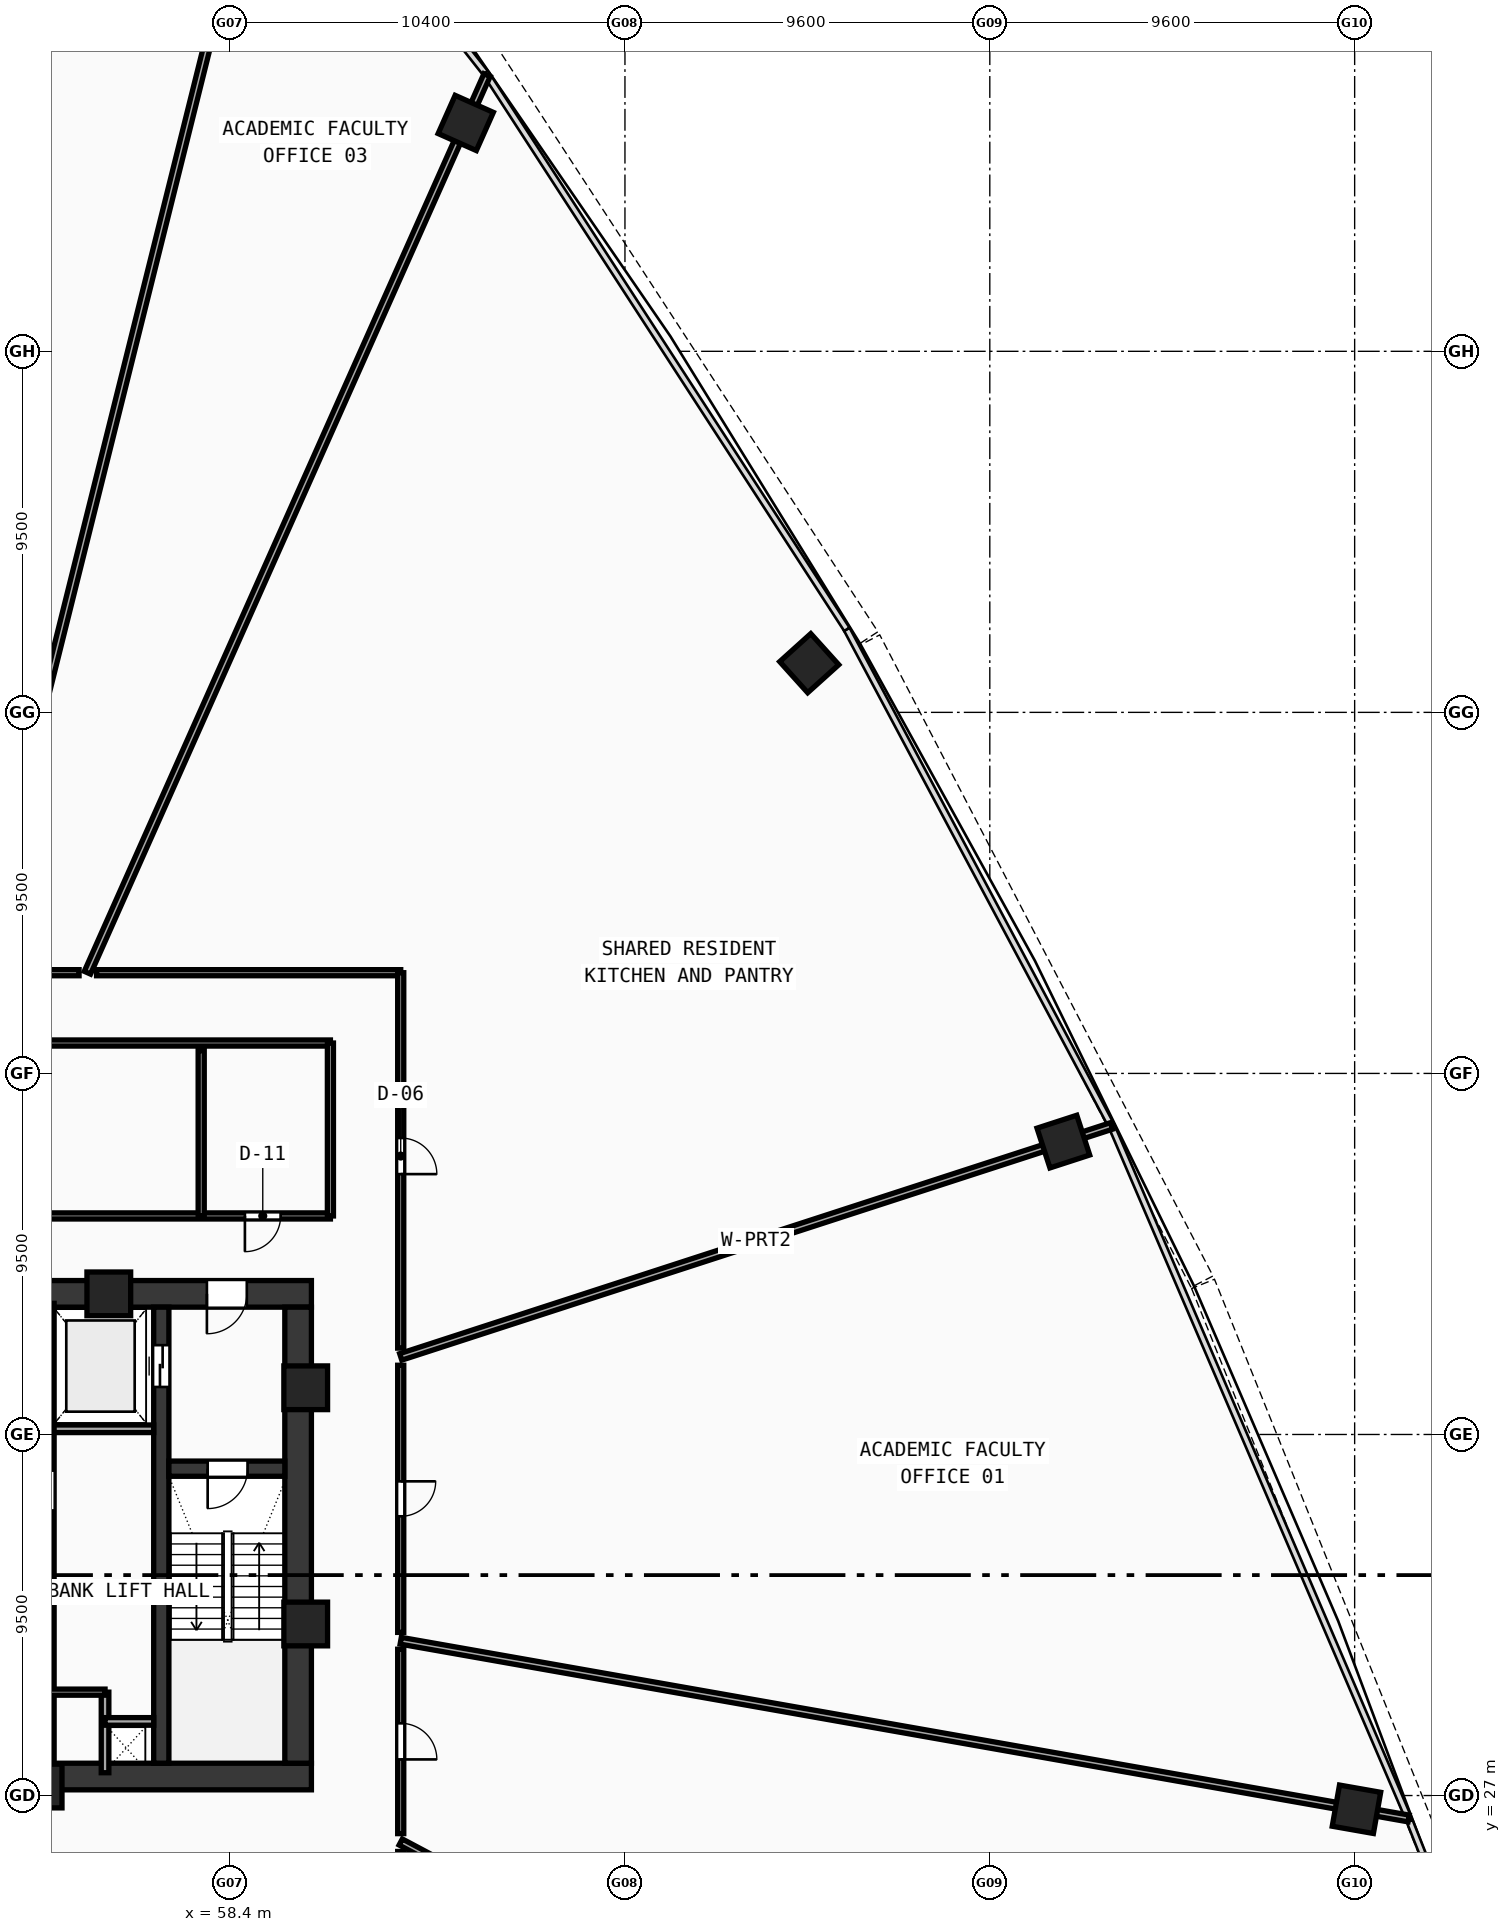
"""IFC4 building model, lengths in metres.
Left out: names, types, materials, properties, quantities, classifications, styles, units other than length and angle.
Written with IfcOpenShell. Run it as: python <this file> out.ifc"""

import sys

from ifc_helpers import new_model, si_unit, direction, frame, frame_2d, origin, origin_with_axes, origin_2d, place, context, subcontext, project, spatial, rectangle, hollow_rectangle, extrude, source, transform, mapped, element, fill, save


model = new_model("IFC4")
c1 = context("Model", 3, precision=1e-05, world=origin(), true_north=direction((0.0, 1.0)))
c2 = subcontext(c1, "Body", "Model", "MODEL_VIEW")
j1 = project(units=[si_unit("LENGTHUNIT", "METRE"), si_unit("PLANEANGLEUNIT", "RADIAN")], contexts=[c1])
p1 = place(None, origin())
s1 = spatial("IfcSite", under=j1, at=p1, CompositionType="ELEMENT")
p2 = place(p1, origin())
s2 = spatial("IfcBuilding", under=s1, at=p2, CompositionType="ELEMENT")
p3 = place(p2, frame((0.0, 0.0, 52.18)))
s3 = spatial("IfcBuildingStorey", under=s2, at=p3, CompositionType="ELEMENT", Elevation=52.18)
p4 = place(p3, frame((35.45, 27.5, 0.0), z_axis=(0.0, 0.0, 1.0), x_axis=(1.0, 0.0, 0.0)))
e1 = element("IfcWall", 1, at=p4, inside=s3, PredefinedType="SHEAR", context=c2, shape_type="SweptSolid", body=[
    extrude(rectangle(XDim=25.1, YDim=0.7, at=frame_2d((12.55, 0.0))), origin(), (0.0, 0.0, 1.0), 3.37),
])
p5 = place(p3, frame((49.2, 40.2, 0.0), z_axis=(0.0, 0.0, 1.0), x_axis=(1.0, 0.0, 0.0)))
e2 = element("IfcWall", 2, at=p5, inside=s3, PredefinedType="SHEAR", context=c2, shape_type="SweptSolid", body=[
    extrude(rectangle(XDim=11.35, YDim=0.7, at=frame_2d((5.675, 0.0))), origin(), (0.0, 0.0, 1.0), 3.37),
])
p6 = place(p5, frame((8.6, 0.0, 0.0)))
e3 = element("IfcOpeningElement", 3, at=p6, cuts=e2, PredefinedType="OPENING", context=c2, shape_type="SweptSolid", body=[
    extrude(rectangle(XDim=1.05, YDim=2.1, at=frame_2d((0.525, 1.05))), frame((0.0, 0.36, 0.0), z_axis=(0.0, -1.0, 0.0), x_axis=(1.0, 0.0, 0.0)), (0.0, 0.0, 1.0), 0.72),
])
p7 = place(p3, frame((60.2, 27.85, 0.0), z_axis=(0.0, 0.0, 1.0), x_axis=(0.0, 1.0, 0.0)))
e4 = element("IfcWall", 4, at=p7, inside=s3, PredefinedType="SHEAR", context=c2, shape_type="SweptSolid", body=[
    extrude(rectangle(XDim=12.0, YDim=0.7, at=frame_2d((6.0, 0.0))), origin(), (0.0, 0.0, 1.0), 3.37),
])
p8 = place(p3, frame((56.6, 27.85, 0.0), z_axis=(0.0, 0.0, 1.0), x_axis=(0.0, 1.0, 0.0)))
e5 = element("IfcWall", 5, at=p8, inside=s3, PredefinedType="SHEAR", context=c2, shape_type="SweptSolid", body=[
    extrude(rectangle(XDim=12.0, YDim=0.4, at=frame_2d((6.0, 0.0))), origin(), (0.0, 0.0, 1.0), 3.37),
])
p9 = place(p8, frame((9.9, 0.0, 0.0)))
e6 = element("IfcOpeningElement", 6, at=p9, cuts=e5, PredefinedType="OPENING", context=c2, shape_type="SweptSolid", body=[
    extrude(rectangle(XDim=1.1, YDim=2.1, at=frame_2d((0.55, 1.05))), frame((0.0, 0.21, 0.0), z_axis=(0.0, -1.0, 0.0), x_axis=(1.0, 0.0, 0.0)), (0.0, 0.0, 1.0), 0.42),
])
p10 = place(p3, frame((56.8, 35.6, 0.0), z_axis=(0.0, 0.0, 1.0), x_axis=(1.0, 0.0, 0.0)))
e7 = element("IfcWall", 7, at=p10, inside=s3, PredefinedType="SHEAR", context=c2, shape_type="SweptSolid", body=[
    extrude(rectangle(XDim=3.05, YDim=0.4, at=frame_2d((1.525, 0.0))), origin(), (0.0, 0.0, 1.0), 3.37),
])
p11 = place(p10, frame((1.02, 0.0, 0.0)))
e8 = element("IfcOpeningElement", 8, at=p11, cuts=e7, PredefinedType="OPENING", context=c2, shape_type="SweptSolid", body=[
    extrude(rectangle(XDim=1.05, YDim=2.1, at=frame_2d((0.525, 1.05))), frame((0.0, 0.21, 0.0), z_axis=(0.0, -1.0, 0.0), x_axis=(1.0, 0.0, 0.0)), (0.0, 0.0, 1.0), 0.42),
])
m1 = source(origin(), c2, "Body", "SweptSolid", [
    extrude(hollow_rectangle(XDim=1.15, YDim=1.15, WallThickness=0.048, at=origin_2d()), origin(), (0.0, 0.0, 1.0), 3.63),
])
for number, where, z_axis, x_axis in (
    (9, (53.412, 27.25, -0.26), (0.0, 0.0, 1.0), (1.0, 0.0, 0.0)),
    (10, (60.4, 31.513, -0.26), (0.0, 0.0, 1.0), (1.0, 0.0, 0.0)),
    (11, (60.4, 37.729, -0.26), (0.0, 0.0, 1.0), (1.0, 0.0, 0.0)),
    (12, (55.219, 40.2, -0.26), (0.0, 0.0, 1.0), (1.0, 0.0, 0.0)),
):
    element("IfcColumn", number, at=place(p3, frame(where, z_axis=z_axis, x_axis=x_axis)), inside=s3, PredefinedType="COLUMN", context=c2, shape_type="MappedRepresentation", body=[
        mapped(m1, transform((0.0, 0.0, 0.0), scale=1.0)),
    ])
m2 = source(origin(), c2, "Body", "SweptSolid", [
    extrude(hollow_rectangle(XDim=1.1, YDim=1.1, WallThickness=0.045, at=origin_2d()), origin(), (0.0, 0.0, 1.0), 3.63),
])
for number, where, z_axis, x_axis in (
    (13, (88.048, 26.638, -0.26), (0.0, 0.0, 1.0), (0.174, 0.985, 0.0)),
    (14, (80.335, 44.206, -0.26), (0.0, 0.0, 1.0), (-0.309, 0.951, 0.0)),
    (15, (73.649, 56.794, -0.26), (0.0, 0.0, 1.0), (-0.669, 0.743, 0.0)),
    (16, (64.611, 71.009, -0.26), (0.0, 0.0, 1.0), (-0.914, 0.407, 0.0)),
):
    element("IfcColumn", number, at=place(p3, frame(where, z_axis=z_axis, x_axis=x_axis)), inside=s3, PredefinedType="COLUMN", context=c2, shape_type="MappedRepresentation", body=[
        mapped(m2, transform((0.0, 0.0, 0.0), scale=1.0)),
    ])
p12 = place(p3, frame((53.68, 36.65, 0.0), z_axis=(0.0, 0.0, 1.0), x_axis=(0.0, 1.0, 0.0)))
e17 = element("IfcWall", 17, at=p12, inside=s3, PredefinedType="SOLIDWALL", context=c2, shape_type="SweptSolid", body=[
    extrude(rectangle(XDim=3.3, YDim=0.2, at=frame_2d((1.65, 0.0))), origin(), (0.0, 0.0, 1.0), 3.37),
])
p13 = place(p3, frame((53.68, 36.65, 0.0), z_axis=(0.0, 0.0, 1.0), x_axis=(1.0, 0.0, 0.0)))
e18 = element("IfcWall", 18, at=p13, inside=s3, PredefinedType="SOLIDWALL", context=c2, shape_type="SweptSolid", body=[
    extrude(rectangle(XDim=2.72, YDim=0.2, at=frame_2d((1.36, 0.0))), origin(), (0.0, 0.0, 1.0), 3.37),
])
p14 = place(p3, frame((53.68, 27.6, 0.0), z_axis=(0.0, 0.0, 1.0), x_axis=(0.0, 1.0, 0.0)))
e19 = element("IfcWall", 19, at=p14, inside=s3, PredefinedType="SOLIDWALL", context=c2, shape_type="SweptSolid", body=[
    extrude(rectangle(XDim=9.05, YDim=0.2, at=frame_2d((4.525, 0.0))), origin(), (0.0, 0.0, 1.0), 3.37),
])
p15 = place(p14, frame((6.9, 0.0, 0.0)))
e20 = element("IfcOpeningElement", 20, at=p15, cuts=e19, PredefinedType="OPENING", context=c2, shape_type="SweptSolid", body=[
    extrude(rectangle(XDim=1.05, YDim=2.1, at=frame_2d((0.525, 1.05))), frame((0.0, 0.11, 0.0), z_axis=(0.0, -1.0, 0.0), x_axis=(1.0, 0.0, 0.0)), (0.0, 0.0, 1.0), 0.22),
])
p16 = place(p3, frame((55.12, 27.6, 0.0), z_axis=(0.0, 0.0, 1.0), x_axis=(0.0, 1.0, 0.0)))
e21 = element("IfcWall", 21, at=p16, inside=s3, PredefinedType="SOLIDWALL", context=c2, shape_type="SweptSolid", body=[
    extrude(rectangle(XDim=2.12, YDim=0.2, at=frame_2d((1.06, 0.0))), origin(), (0.0, 0.0, 1.0), 3.37),
])
p17 = place(p3, frame((55.12, 28.95, 0.0), z_axis=(0.0, 0.0, 1.0), x_axis=(1.0, 0.0, 0.0)))
e22 = element("IfcWall", 22, at=p17, inside=s3, PredefinedType="SOLIDWALL", context=c2, shape_type="SweptSolid", body=[
    extrude(rectangle(XDim=1.28, YDim=0.2, at=frame_2d((0.64, 0.0))), origin(), (0.0, 0.0, 1.0), 3.37),
])
p18 = place(p3, frame((51.05, 29.72, 0.0), z_axis=(0.0, 0.0, 1.0), x_axis=(1.0, 0.0, 0.0)))
e23 = element("IfcWall", 23, at=p18, inside=s3, PredefinedType="PARTITIONING", context=c2, shape_type="SweptSolid", body=[
    extrude(rectangle(XDim=4.07, YDim=0.16, at=frame_2d((2.035, 0.0))), origin(), (0.0, 0.0, 1.0), 3.37),
])
p19 = place(p18, frame((0.5, 0.0, 0.0)))
e24 = element("IfcOpeningElement", 24, at=p19, cuts=e23, PredefinedType="OPENING", context=c2, shape_type="SweptSolid", body=[
    extrude(rectangle(XDim=0.9, YDim=2.1, at=frame_2d((0.45, 1.05))), frame((0.0, 0.09, 0.0), z_axis=(0.0, -1.0, 0.0), x_axis=(1.0, 0.0, 0.0)), (0.0, 0.0, 1.0), 0.18),
])
p20 = place(p3, frame((45.92, 42.25, 0.0), z_axis=(0.0, 0.0, 1.0), x_axis=(1.0, 0.0, 0.0)))
e25 = element("IfcWall", 25, at=p20, inside=s3, PredefinedType="PARTITIONING", context=c2, shape_type="SweptSolid", body=[
    extrude(rectangle(XDim=15.13, YDim=0.16, at=frame_2d((7.565, 0.0))), origin(), (0.0, 0.0, 1.0), 2.67),
])
p21 = place(p20, frame((2.1, 0.0, 0.0)))
e26 = element("IfcOpeningElement", 26, at=p21, cuts=e25, PredefinedType="OPENING", context=c2, shape_type="SweptSolid", body=[
    extrude(rectangle(XDim=0.92, YDim=2.1, at=frame_2d((0.46, 1.05))), frame((0.0, 0.09, 0.0), z_axis=(0.0, -1.0, 0.0), x_axis=(1.0, 0.0, 0.0)), (0.0, 0.0, 1.0), 0.18),
])
p22 = place(p20, frame((12.88, 0.0, 0.0)))
e27 = element("IfcOpeningElement", 27, at=p22, cuts=e25, PredefinedType="OPENING", context=c2, shape_type="SweptSolid", body=[
    extrude(rectangle(XDim=0.94, YDim=2.1, at=frame_2d((0.47, 1.05))), frame((0.0, 0.09, 0.0), z_axis=(0.0, -1.0, 0.0), x_axis=(1.0, 0.0, 0.0)), (0.0, 0.0, 1.0), 0.18),
])
p23 = place(p3, frame((45.92, 46.8, 0.0), z_axis=(0.0, 0.0, 1.0), x_axis=(1.0, 0.0, 0.0)))
e28 = element("IfcWall", 28, at=p23, inside=s3, PredefinedType="PARTITIONING", context=c2, shape_type="SweptSolid", body=[
    extrude(rectangle(XDim=15.13, YDim=0.16, at=frame_2d((7.565, 0.0))), origin(), (0.0, 0.0, 1.0), 2.67),
])
p24 = place(p3, frame((61.05, 42.25, 0.0), z_axis=(0.0, 0.0, 1.0), x_axis=(0.0, 1.0, 0.0)))
e29 = element("IfcWall", 29, at=p24, inside=s3, PredefinedType="PARTITIONING", context=c2, shape_type="SweptSolid", body=[
    extrude(rectangle(XDim=4.55, YDim=0.16, at=frame_2d((2.275, 0.0))), origin(), (0.0, 0.0, 1.0), 2.67),
])
p25 = place(p3, frame((57.65, 42.25, 0.0), z_axis=(0.0, 0.0, 1.0), x_axis=(0.0, 1.0, 0.0)))
e30 = element("IfcWall", 30, at=p25, inside=s3, PredefinedType="PARTITIONING", context=c2, shape_type="SweptSolid", body=[
    extrude(rectangle(XDim=4.35, YDim=0.16, at=frame_2d((2.175, 0.0))), origin(), (0.0, 0.0, 1.0), 2.67),
])
p26 = place(p3, frame((62.9, 38.541, 0.0), z_axis=(0.0, 0.0, 1.0), x_axis=(0.951053317048, 0.309026840471, 0.0)))
e31 = element("IfcWall", 31, at=p26, inside=s3, PredefinedType="PARTITIONING", context=c2, shape_type="SweptSolid", body=[
    extrude(rectangle(XDim=19.666, YDim=0.18, at=frame_2d((9.833, 0.0))), origin(), (0.0, 0.0, 1.0), 2.67),
])
p27 = place(p3, frame((54.656, 48.65, 0.0), z_axis=(0.0, 0.0, 1.0), x_axis=(0.406729800422, 0.913548504158, 0.0)))
e32 = element("IfcWall", 32, at=p27, inside=s3, PredefinedType="PARTITIONING", context=c2, shape_type="SweptSolid", body=[
    extrude(rectangle(XDim=25.854, YDim=0.18, at=frame_2d((12.927, 0.0))), origin(), (0.0, 0.0, 1.0), 2.67),
])
p28 = place(p3, frame((51.728, 48.65, 0.0), z_axis=(0.0, 0.0, 1.0), x_axis=(0.241918895985, 0.970296474159, 0.0)))
e33 = element("IfcWall", 33, at=p28, inside=s3, PredefinedType="PARTITIONING", context=c2, shape_type="SweptSolid", body=[
    extrude(rectangle(XDim=31.858, YDim=0.18, at=frame_2d((15.929, 0.0))), origin(), (0.0, 0.0, 1.0), 2.67),
])
p29 = place(p3, frame((62.9, 25.778, 0.0), z_axis=(0.0, 0.0, 1.0), x_axis=(0.882949316257, -0.469468321531, 0.0)))
e34 = element("IfcWall", 34, at=p29, inside=s3, PredefinedType="PARTITIONING", context=c2, shape_type="SweptSolid", body=[
    extrude(rectangle(XDim=24.437, YDim=0.18, at=frame_2d((12.219, 0.0))), origin(), (0.0, 0.0, 1.0), 2.67),
])
p30 = place(p3, frame((62.9, 31.073, 0.0), z_axis=(0.0, 0.0, 1.0), x_axis=(0.984808099647, -0.173646211791, 0.0)))
e35 = element("IfcWall", 35, at=p30, inside=s3, PredefinedType="PARTITIONING", context=c2, shape_type="SweptSolid", body=[
    extrude(rectangle(XDim=26.93, YDim=0.18, at=frame_2d((13.465, 0.0))), origin(), (0.0, 0.0, 1.0), 2.67),
])
p31 = place(p3, frame((51.954, 48.65, 0.0), z_axis=(0.0, 0.0, 1.0), x_axis=(1.0, 0.0, 0.0)))
e36 = element("IfcWall", 36, at=p31, inside=s3, PredefinedType="PARTITIONING", context=c2, shape_type="SweptSolid", body=[
    extrude(rectangle(XDim=2.482, YDim=0.16, at=frame_2d((1.241, 0.0))), origin(), (0.0, 0.0, 1.0), 2.67),
])
p32 = place(p31, frame((0.778, 0.0, 0.0)))
e37 = element("IfcOpeningElement", 37, at=p32, cuts=e36, PredefinedType="OPENING", context=c2, shape_type="SweptSolid", body=[
    extrude(rectangle(XDim=0.92, YDim=2.1, at=frame_2d((0.46, 1.05))), frame((0.0, 0.09, 0.0), z_axis=(0.0, -1.0, 0.0), x_axis=(1.0, 0.0, 0.0)), (0.0, 0.0, 1.0), 0.18),
])
p33 = place(p3, frame((54.897, 48.65, 0.0), z_axis=(0.0, 0.0, 1.0), x_axis=(1.0, 0.0, 0.0)))
e38 = element("IfcWall", 38, at=p33, inside=s3, PredefinedType="PARTITIONING", context=c2, shape_type="SweptSolid", body=[
    extrude(rectangle(XDim=8.003, YDim=0.16, at=frame_2d((4.001, 0.0))), origin(), (0.0, 0.0, 1.0), 2.97),
])
p34 = place(p3, frame((62.9, 48.65, 0.0), z_axis=(0.0, 0.0, 1.0), x_axis=(0.0, -1.0, 0.0)))
e39 = element("IfcWall", 39, at=p34, inside=s3, PredefinedType="PARTITIONING", context=c2, shape_type="SweptSolid", body=[
    extrude(rectangle(XDim=9.877, YDim=0.16, at=frame_2d((4.938, 0.0))), origin(), (0.0, 0.0, 1.0), 2.67),
])
p35 = place(p34, frame((4.349, 0.0, 0.0)))
e40 = element("IfcOpeningElement", 40, at=p35, cuts=e39, PredefinedType="OPENING", context=c2, shape_type="SweptSolid", body=[
    extrude(rectangle(XDim=0.95, YDim=2.1, at=frame_2d((0.475, 1.05))), frame((0.0, 0.09, 0.0), z_axis=(0.0, -1.0, 0.0), x_axis=(1.0, 0.0, 0.0)), (0.0, 0.0, 1.0), 0.18),
])
p36 = place(p3, frame((62.9, 38.322, 0.0), z_axis=(0.0, 0.0, 1.0), x_axis=(0.0, -1.0, 0.0)))
e41 = element("IfcWall", 41, at=p36, inside=s3, PredefinedType="PARTITIONING", context=c2, shape_type="SweptSolid", body=[
    extrude(rectangle(XDim=7.029, YDim=0.16, at=frame_2d((3.515, 0.0))), origin(), (0.0, 0.0, 1.0), 3.37),
])
p37 = place(p36, frame((3.054, 0.0, 0.0)))
e42 = element("IfcOpeningElement", 42, at=p37, cuts=e41, PredefinedType="OPENING", context=c2, shape_type="SweptSolid", body=[
    extrude(rectangle(XDim=0.92, YDim=2.1, at=frame_2d((0.46, 1.05))), frame((0.0, 0.09, 0.0), z_axis=(0.0, -1.0, 0.0), x_axis=(1.0, 0.0, 0.0)), (0.0, 0.0, 1.0), 0.18),
])
p38 = place(p3, frame((62.9, 30.849, 0.0), z_axis=(0.0, 0.0, 1.0), x_axis=(0.0, -1.0, 0.0)))
e43 = element("IfcWall", 43, at=p38, inside=s3, PredefinedType="PARTITIONING", context=c2, shape_type="SweptSolid", body=[
    extrude(rectangle(XDim=4.852, YDim=0.16, at=frame_2d((2.426, 0.0))), origin(), (0.0, 0.0, 1.0), 3.37),
])
p39 = place(p38, frame((1.949, 0.0, 0.0)))
e44 = element("IfcOpeningElement", 44, at=p39, cuts=e43, PredefinedType="OPENING", context=c2, shape_type="SweptSolid", body=[
    extrude(rectangle(XDim=0.95, YDim=2.1, at=frame_2d((0.475, 1.05))), frame((0.0, 0.09, 0.0), z_axis=(0.0, -1.0, 0.0), x_axis=(1.0, 0.0, 0.0)), (0.0, 0.0, 1.0), 0.18),
])
p40 = place(p3, frame((62.9, 25.528, 0.0), z_axis=(0.0, 0.0, 1.0), x_axis=(0.0, -1.0, 0.0)))
e45 = element("IfcWall", 45, at=p40, inside=s3, PredefinedType="PARTITIONING", context=c2, shape_type="SweptSolid", body=[
    extrude(rectangle(XDim=0.728, YDim=0.16, at=frame_2d((0.364, 0.0))), origin(), (0.0, 0.0, 1.0), 2.97),
])
m3 = source(origin(), c2, "Body", "SweptSolid", [
    extrude(rectangle(XDim=1.05, YDim=2.1, at=frame_2d((0.525, 1.05))), frame((0.0, 0.025, 0.0), z_axis=(0.0, -1.0, 0.0), x_axis=(1.0, 0.0, 0.0)), (0.0, 0.0, 1.0), 0.05),
])
p41 = place(p11, frame((1.05, 0.0, 0.0), z_axis=(0.0, 0.0, 1.0), x_axis=(-1.0, 0.0, 0.0)))
e46 = element("IfcDoor", 46, at=p41, inside=s3, OperationType="SINGLE_SWING_RIGHT", PredefinedType="DOOR", context=c2, shape_type="MappedRepresentation", body=[
    mapped(m3, transform((0.0, 0.0, 0.0), scale=1.0)),
])
fill(e8, e46)
p42 = place(p6, frame((1.05, 0.0, 0.0), z_axis=(0.0, 0.0, 1.0), x_axis=(-1.0, 0.0, 0.0)))
e47 = element("IfcDoor", 47, at=p42, inside=s3, OperationType="SINGLE_SWING_RIGHT", PredefinedType="DOOR", context=c2, shape_type="MappedRepresentation", body=[
    mapped(m3, transform((0.0, 0.0, 0.0), scale=1.0)),
])
fill(e3, e47)
m4 = source(origin(), c2, "Body", "SweptSolid", [
    extrude(rectangle(XDim=1.1, YDim=2.1, at=frame_2d((0.55, 1.05))), frame((0.0, 0.025, 0.0), z_axis=(0.0, -1.0, 0.0), x_axis=(1.0, 0.0, 0.0)), (0.0, 0.0, 1.0), 0.05),
])
p43 = place(p9, origin_with_axes())
e48 = element("IfcDoor", 48, at=p43, inside=s3, OperationType="DOUBLE_DOOR_SLIDING", PredefinedType="DOOR", context=c2, shape_type="MappedRepresentation", body=[
    mapped(m4, transform((0.0, 0.0, 0.0), scale=1.0)),
])
fill(e6, e48)
m5 = source(origin(), c2, "Body", "SweptSolid", [
    extrude(rectangle(XDim=0.94, YDim=2.1, at=frame_2d((0.47, 1.05))), frame((0.0, 0.025, 0.0), z_axis=(0.0, -1.0, 0.0), x_axis=(1.0, 0.0, 0.0)), (0.0, 0.0, 1.0), 0.05),
])
p44 = place(p22, frame((0.94, 0.0, 0.0), z_axis=(0.0, 0.0, 1.0), x_axis=(-1.0, 0.0, 0.0)))
e49 = element("IfcDoor", 49, at=p44, inside=s3, OperationType="SINGLE_SWING_RIGHT", PredefinedType="DOOR", context=c2, shape_type="MappedRepresentation", body=[
    mapped(m5, transform((0.0, 0.0, 0.0), scale=1.0)),
])
fill(e27, e49)
m6 = source(origin(), c2, "Body", "SweptSolid", [
    extrude(rectangle(XDim=0.92, YDim=2.1, at=frame_2d((0.46, 1.05))), frame((0.0, 0.025, 0.0), z_axis=(0.0, -1.0, 0.0), x_axis=(1.0, 0.0, 0.0)), (0.0, 0.0, 1.0), 0.05),
])
p45 = place(p37, origin_with_axes())
e50 = element("IfcDoor", 50, at=p45, inside=s3, OperationType="SINGLE_SWING_LEFT", PredefinedType="DOOR", context=c2, shape_type="MappedRepresentation", body=[
    mapped(m6, transform((0.0, 0.0, 0.0), scale=1.0)),
])
fill(e42, e50)
m7 = source(origin(), c2, "Body", "SweptSolid", [
    extrude(rectangle(XDim=0.95, YDim=2.1, at=frame_2d((0.475, 1.05))), frame((0.0, 0.025, 0.0), z_axis=(0.0, -1.0, 0.0), x_axis=(1.0, 0.0, 0.0)), (0.0, 0.0, 1.0), 0.05),
])
p46 = place(p35, origin_with_axes())
e51 = element("IfcDoor", 51, at=p46, inside=s3, OperationType="SINGLE_SWING_RIGHT", PredefinedType="DOOR", context=c2, shape_type="MappedRepresentation", body=[
    mapped(m7, transform((0.0, 0.0, 0.0), scale=1.0)),
])
fill(e40, e51)
p47 = place(p39, origin_with_axes())
e52 = element("IfcDoor", 52, at=p47, inside=s3, OperationType="SINGLE_SWING_RIGHT", PredefinedType="DOOR", context=c2, shape_type="MappedRepresentation", body=[
    mapped(m7, transform((0.0, 0.0, 0.0), scale=1.0)),
])
fill(e44, e52)
save(model, sys.argv[1])
